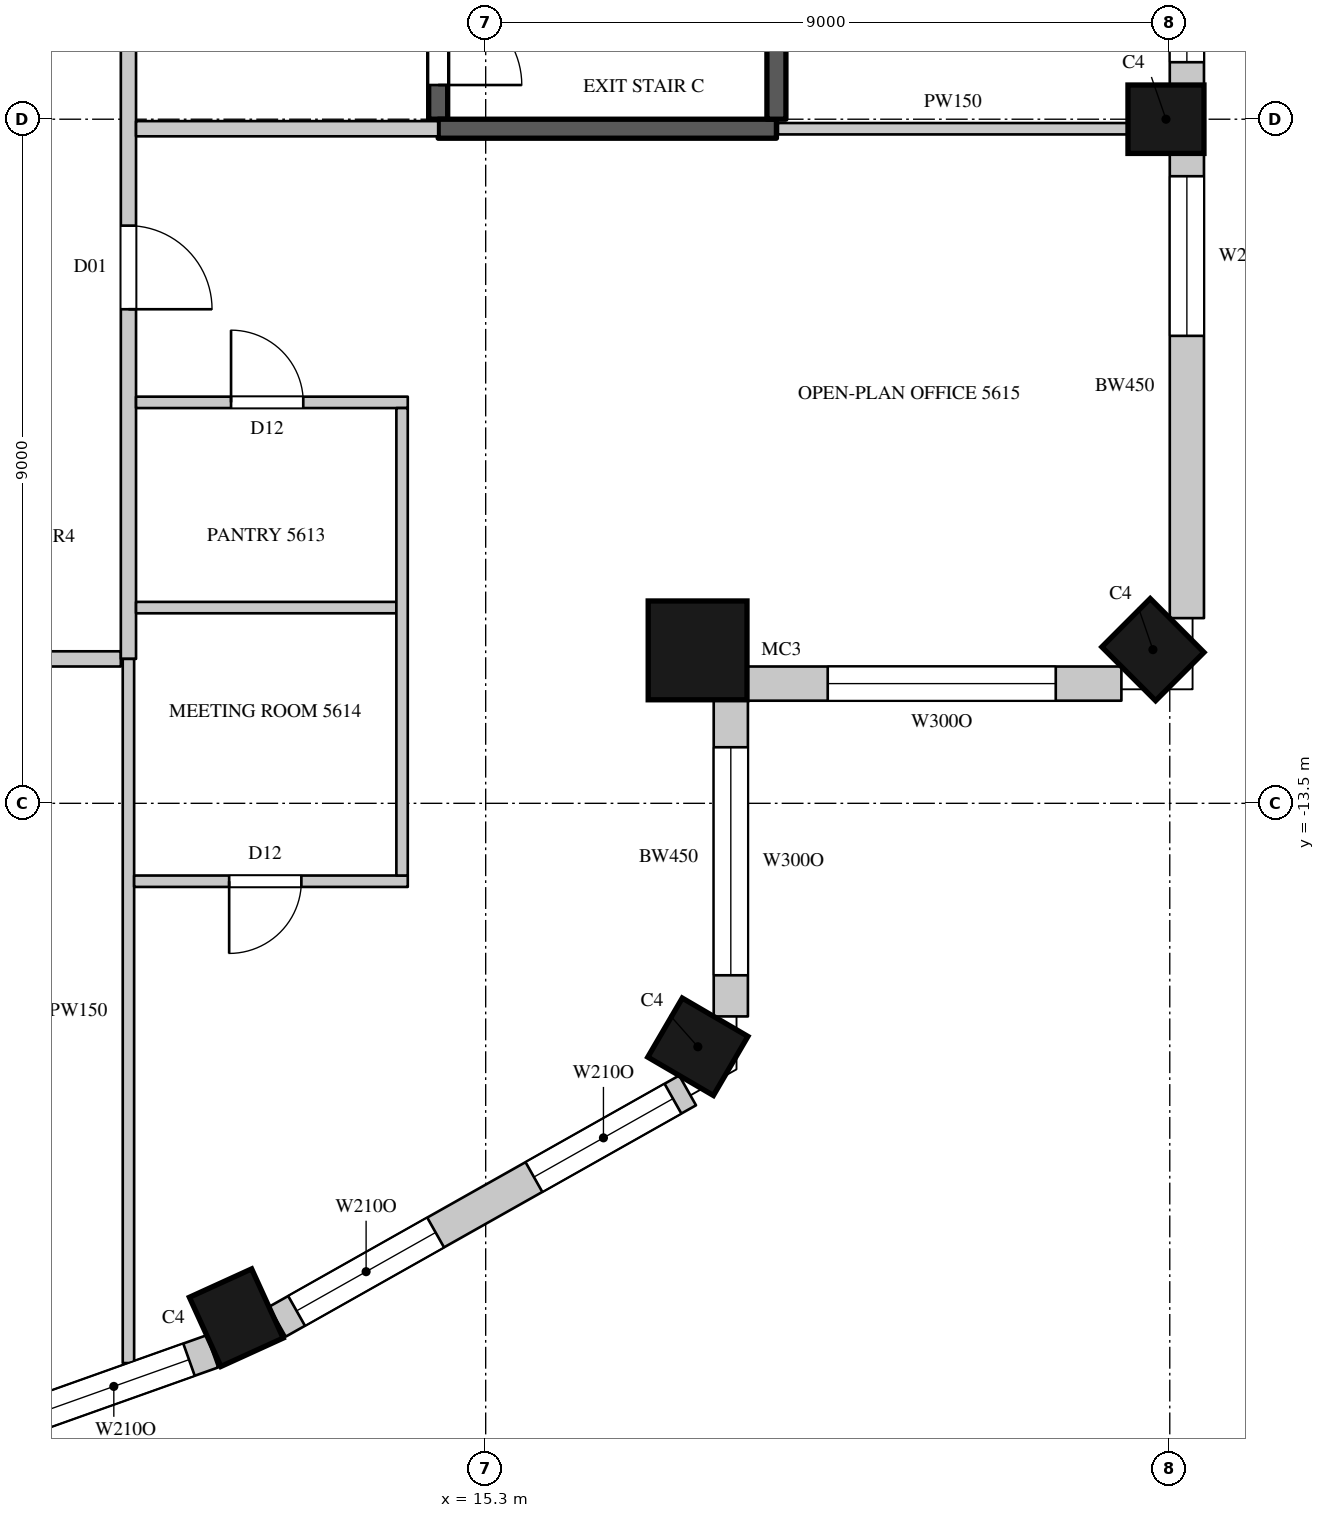
"""IFC4 building model, lengths in metres.
Left out: names, types, materials, properties, quantities, classifications, styles, units other than length and angle.
Written with IfcOpenShell. Run it as: python <this file> out.ifc"""

import sys

from ifc_helpers import new_model, si_unit, direction, frame, frame_2d, origin, origin_2d, place, context, subcontext, project, spatial, rectangle, circle, extrude, element, fill, save


model = new_model("IFC4")
c1 = context("Model", 3, precision=1e-05, world=origin(), true_north=direction((0.0, 1.0)))
c2 = subcontext(c1, "Body", "Model", "MODEL_VIEW")
j1 = project(units=[si_unit("LENGTHUNIT", "METRE"), si_unit("PLANEANGLEUNIT", "RADIAN")], contexts=[c1])
p1 = place(None, origin())
s1 = spatial("IfcSite", under=j1, at=p1, CompositionType="ELEMENT")
p2 = place(p1, origin())
s2 = spatial("IfcBuilding", under=s1, at=p2, CompositionType="ELEMENT")
p3 = place(p2, frame((0.0, 0.0, 251.6)))
s3 = spatial("IfcBuildingStorey", under=s2, at=p3, CompositionType="ELEMENT", Elevation=251.6)
for number, where, z_axis, x_axis in (
    (1, (12.019, -20.267, 0.0), (0.0, 0.0, 1.0), (0.91, 0.415, 0.0)),
    (2, (18.091, -16.703, 0.0), (0.0, 0.0, 1.0), (0.504, 0.863, 0.0)),
):
    element("IfcColumn", number, at=place(p3, frame(where, z_axis=z_axis, x_axis=x_axis)), inside=s3, PredefinedType="COLUMN", context=c2, shape_type="SweptSolid", body=[
        extrude(rectangle(XDim=0.9, YDim=1.0, at=origin_2d()), origin(), (0.0, 0.0, 1.0), 4.1),
    ])
p4 = place(p3, frame((18.088, -11.488, 0.0), z_axis=(0.0, 0.0, 1.0), x_axis=(1.0, 0.0, 0.0)))
e3 = element("IfcColumn", 3, at=p4, inside=s3, PredefinedType="COLUMN", context=c2, shape_type="SweptSolid", body=[
    extrude(circle(Radius=0.65, at=origin_2d()), origin(), (0.0, 0.0, 1.0), 4.1),
])
for number, where, z_axis, x_axis in (
    (4, (24.078, -11.478, 0.0), (0.0, 0.0, 1.0), (0.707, 0.707, 0.0)),
    (5, (24.25, -4.5, 0.0), (0.0, 0.0, 1.0), (0.0, 1.0, 0.0)),
):
    element("IfcColumn", number, at=place(p3, frame(where, z_axis=z_axis, x_axis=x_axis)), inside=s3, PredefinedType="COLUMN", context=c2, shape_type="SweptSolid", body=[
        extrude(rectangle(XDim=0.9, YDim=1.0, at=origin_2d()), origin(), (0.0, 0.0, 1.0), 4.1),
    ])
p5 = place(p3, frame((5.665, -22.859, 0.0), z_axis=(0.0, 0.0, 1.0), x_axis=(0.942108340262, 0.335308626803, 0.0)))
e6 = element("IfcWall", 6, at=p5, inside=s3, PredefinedType="SOLIDWALL", context=c2, shape_type="SweptSolid", body=[
    extrude(rectangle(XDim=6.412, YDim=0.45, at=frame_2d((3.206, 0.0))), origin(), (0.0, 0.0, 1.0), 3.8),
])
p6 = place(p5, frame((0.327, 0.0, 1.05)))
e7 = element("IfcOpeningElement", 7, at=p6, cuts=e6, PredefinedType="OPENING", context=c2, shape_type="SweptSolid", body=[
    extrude(rectangle(XDim=2.1, YDim=2.4, at=frame_2d((1.05, 1.2))), frame((0.0, 0.235, 0.0), z_axis=(0.0, -1.0, 0.0), x_axis=(1.0, 0.0, 0.0)), (0.0, 0.0, 1.0), 0.47),
])
p7 = place(p5, frame((3.985, 0.0, 1.05)))
e8 = element("IfcOpeningElement", 8, at=p7, cuts=e6, PredefinedType="OPENING", context=c2, shape_type="SweptSolid", body=[
    extrude(rectangle(XDim=2.1, YDim=2.4, at=frame_2d((1.05, 1.2))), frame((0.0, 0.235, 0.0), z_axis=(0.0, -1.0, 0.0), x_axis=(1.0, 0.0, 0.0)), (0.0, 0.0, 1.0), 0.47),
])
p8 = place(p3, frame((12.559, -20.32, 0.0), z_axis=(0.0, 0.0, 1.0), x_axis=(0.871065783524, 0.491166367714, 0.0)))
e9 = element("IfcWall", 9, at=p8, inside=s3, PredefinedType="SOLIDWALL", context=c2, shape_type="SweptSolid", body=[
    extrude(rectangle(XDim=6.196, YDim=0.45, at=frame_2d((3.098, 0.0))), origin(), (0.0, 0.0, 1.0), 3.8),
])
p9 = place(p8, frame((0.291, 0.0, 1.05)))
e10 = element("IfcOpeningElement", 10, at=p9, cuts=e9, PredefinedType="OPENING", context=c2, shape_type="SweptSolid", body=[
    extrude(rectangle(XDim=2.1, YDim=2.4, at=frame_2d((1.05, 1.2))), frame((0.0, 0.235, 0.0), z_axis=(0.0, -1.0, 0.0), x_axis=(1.0, 0.0, 0.0)), (0.0, 0.0, 1.0), 0.47),
])
p10 = place(p8, frame((3.875, 0.0, 1.05)))
e11 = element("IfcOpeningElement", 11, at=p10, cuts=e9, PredefinedType="OPENING", context=c2, shape_type="SweptSolid", body=[
    extrude(rectangle(XDim=2.1, YDim=2.4, at=frame_2d((1.05, 1.2))), frame((0.0, 0.235, 0.0), z_axis=(0.0, -1.0, 0.0), x_axis=(1.0, 0.0, 0.0)), (0.0, 0.0, 1.0), 0.47),
])
p11 = place(p3, frame((18.525, -16.304, 0.0), z_axis=(0.0, 0.0, 1.0), x_axis=(0.0, 1.0, 0.0)))
e12 = element("IfcWall", 12, at=p11, inside=s3, PredefinedType="SOLIDWALL", context=c2, shape_type="SweptSolid", body=[
    extrude(rectangle(XDim=4.202, YDim=0.45, at=frame_2d((2.101, 0.0))), origin(), (0.0, 0.0, 1.0), 3.8),
])
p12 = place(p11, frame((0.541, 0.0, 1.05)))
e13 = element("IfcOpeningElement", 13, at=p12, cuts=e12, PredefinedType="OPENING", context=c2, shape_type="SweptSolid", body=[
    extrude(rectangle(XDim=3.0, YDim=2.4, at=frame_2d((1.5, 1.2))), frame((0.0, 0.235, 0.0), z_axis=(0.0, -1.0, 0.0), x_axis=(1.0, 0.0, 0.0)), (0.0, 0.0, 1.0), 0.47),
])
p13 = place(p3, frame((18.701, -11.925, 0.0), z_axis=(0.0, 0.0, 1.0), x_axis=(1.0, 0.0, 0.0)))
e14 = element("IfcWall", 14, at=p13, inside=s3, PredefinedType="SOLIDWALL", context=c2, shape_type="SweptSolid", body=[
    extrude(rectangle(XDim=4.962, YDim=0.45, at=frame_2d((2.481, 0.0))), origin(), (0.0, 0.0, 1.0), 3.8),
])
p14 = place(p13, frame((1.098, 0.0, 1.05)))
e15 = element("IfcOpeningElement", 15, at=p14, cuts=e14, PredefinedType="OPENING", context=c2, shape_type="SweptSolid", body=[
    extrude(rectangle(XDim=3.0, YDim=2.4, at=frame_2d((1.5, 1.2))), frame((0.0, 0.235, 0.0), z_axis=(0.0, -1.0, 0.0), x_axis=(1.0, 0.0, 0.0)), (0.0, 0.0, 1.0), 0.47),
])
p15 = place(p3, frame((24.525, -11.064, 0.0), z_axis=(0.0, 0.0, 1.0), x_axis=(0.0, 1.0, 0.0)))
e16 = element("IfcWall", 16, at=p15, inside=s3, PredefinedType="SOLIDWALL", context=c2, shape_type="SweptSolid", body=[
    extrude(rectangle(XDim=6.114, YDim=0.45, at=frame_2d((3.057, 0.0))), origin(), (0.0, 0.0, 1.0), 3.8),
])
p16 = place(p15, frame((3.714, 0.0, 1.05)))
e17 = element("IfcOpeningElement", 17, at=p16, cuts=e16, PredefinedType="OPENING", context=c2, shape_type="SweptSolid", body=[
    extrude(rectangle(XDim=2.1, YDim=2.4, at=frame_2d((1.05, 1.2))), frame((0.0, 0.235, 0.0), z_axis=(0.0, -1.0, 0.0), x_axis=(1.0, 0.0, 0.0)), (0.0, 0.0, 1.0), 0.47),
])
p17 = place(p3, frame((24.525, -4.05, 0.0), z_axis=(0.0, 0.0, 1.0), x_axis=(0.0, 1.0, 0.0)))
e18 = element("IfcWall", 18, at=p17, inside=s3, PredefinedType="SOLIDWALL", context=c2, shape_type="SweptSolid", body=[
    extrude(rectangle(XDim=8.1, YDim=0.45, at=frame_2d((4.05, 0.0))), origin(), (0.0, 0.0, 1.0), 3.8),
])
p18 = place(p17, frame((0.3, 0.0, 1.05)))
e19 = element("IfcOpeningElement", 19, at=p18, cuts=e18, PredefinedType="OPENING", context=c2, shape_type="SweptSolid", body=[
    extrude(rectangle(XDim=3.0, YDim=2.4, at=frame_2d((1.5, 1.2))), frame((0.0, 0.235, 0.0), z_axis=(0.0, -1.0, 0.0), x_axis=(1.0, 0.0, 0.0)), (0.0, 0.0, 1.0), 0.47),
])
p19 = place(p17, frame((4.8, 0.0, 1.05)))
e20 = element("IfcOpeningElement", 20, at=p19, cuts=e18, PredefinedType="OPENING", context=c2, shape_type="SweptSolid", body=[
    extrude(rectangle(XDim=3.0, YDim=2.4, at=frame_2d((1.5, 1.2))), frame((0.0, 0.235, 0.0), z_axis=(0.0, -1.0, 0.0), x_axis=(1.0, 0.0, 0.0)), (0.0, 0.0, 1.0), 0.47),
])
p20 = place(p3, frame((-10.9, -11.6, 0.0), z_axis=(0.0, 0.0, 1.0), x_axis=(1.0, 0.0, 0.0)))
e21 = element("IfcWall", 21, at=p20, inside=s3, PredefinedType="PARTITIONING", context=c2, shape_type="SweptSolid", body=[
    extrude(rectangle(XDim=21.4, YDim=0.2, at=frame_2d((10.7, 0.0))), origin(), (0.0, 0.0, 1.0), 3.8),
])
p21 = place(p20, frame((0.95, 0.0, 0.0)))
e22 = element("IfcOpeningElement", 22, at=p21, cuts=e21, PredefinedType="OPENING", context=c2, shape_type="SweptSolid", body=[
    extrude(rectangle(XDim=0.9, YDim=2.2, at=frame_2d((0.45, 1.1))), frame((0.0, 0.11, 0.0), z_axis=(0.0, -1.0, 0.0), x_axis=(1.0, 0.0, 0.0)), (0.0, 0.0, 1.0), 0.22),
])
p22 = place(p20, frame((4.2, 0.0, 0.0)))
e23 = element("IfcOpeningElement", 23, at=p22, cuts=e21, PredefinedType="OPENING", context=c2, shape_type="SweptSolid", body=[
    extrude(rectangle(XDim=0.9, YDim=2.2, at=frame_2d((0.45, 1.1))), frame((0.0, 0.11, 0.0), z_axis=(0.0, -1.0, 0.0), x_axis=(1.0, 0.0, 0.0)), (0.0, 0.0, 1.0), 0.22),
])
p23 = place(p20, frame((6.85, 0.0, 0.0)))
e24 = element("IfcOpeningElement", 24, at=p23, cuts=e21, PredefinedType="OPENING", context=c2, shape_type="SweptSolid", body=[
    extrude(rectangle(XDim=1.1, YDim=2.4, at=frame_2d((0.55, 1.2))), frame((0.0, 0.11, 0.0), z_axis=(0.0, -1.0, 0.0), x_axis=(1.0, 0.0, 0.0)), (0.0, 0.0, 1.0), 0.22),
])
p24 = place(p20, frame((9.8, 0.0, 0.0)))
e25 = element("IfcOpeningElement", 25, at=p24, cuts=e21, PredefinedType="OPENING", context=c2, shape_type="SweptSolid", body=[
    extrude(rectangle(XDim=1.1, YDim=2.4, at=frame_2d((0.55, 1.2))), frame((0.0, 0.11, 0.0), z_axis=(0.0, -1.0, 0.0), x_axis=(1.0, 0.0, 0.0)), (0.0, 0.0, 1.0), 0.22),
])
p25 = place(p3, frame((10.6, -11.6, 0.0), z_axis=(0.0, 0.0, 1.0), x_axis=(0.0, 1.0, 0.0)))
e26 = element("IfcWall", 26, at=p25, inside=s3, PredefinedType="PARTITIONING", context=c2, shape_type="SweptSolid", body=[
    extrude(rectangle(XDim=23.7, YDim=0.2, at=frame_2d((11.85, 0.0))), origin(), (0.0, 0.0, 1.0), 3.8),
])
p26 = place(p25, frame((9.45, 0.0, 0.0)))
e27 = element("IfcOpeningElement", 27, at=p26, cuts=e26, PredefinedType="OPENING", context=c2, shape_type="SweptSolid", body=[
    extrude(rectangle(XDim=1.5, YDim=2.4, at=frame_2d((0.75, 1.2))), frame((0.0, 0.11, 0.0), z_axis=(0.0, -1.0, 0.0), x_axis=(1.0, 0.0, 0.0)), (0.0, 0.0, 1.0), 0.22),
])
p27 = place(p25, frame((19.45, 0.0, 0.0)))
e28 = element("IfcOpeningElement", 28, at=p27, cuts=e26, PredefinedType="OPENING", context=c2, shape_type="SweptSolid", body=[
    extrude(rectangle(XDim=1.1, YDim=2.4, at=frame_2d((0.55, 1.2))), frame((0.0, 0.11, 0.0), z_axis=(0.0, -1.0, 0.0), x_axis=(1.0, 0.0, 0.0)), (0.0, 0.0, 1.0), 0.22),
])
p28 = place(p25, frame((4.6, 0.0, 0.0)))
e29 = element("IfcOpeningElement", 29, at=p28, cuts=e26, PredefinedType="OPENING", context=c2, shape_type="SweptSolid", body=[
    extrude(rectangle(XDim=1.1, YDim=2.4, at=frame_2d((0.55, 1.2))), frame((0.0, 0.11, 0.0), z_axis=(0.0, -1.0, 0.0), x_axis=(1.0, 0.0, 0.0)), (0.0, 0.0, 1.0), 0.22),
])
p29 = place(p3, frame((10.7, -4.625, 0.0), z_axis=(0.0, 0.0, 1.0), x_axis=(1.0, 0.0, 0.0)))
e30 = element("IfcWall", 30, at=p29, inside=s3, PredefinedType="PARTITIONING", context=c2, shape_type="SweptSolid", body=[
    extrude(rectangle(XDim=3.975, YDim=0.2, at=frame_2d((1.988, 0.0))), origin(), (0.0, 0.0, 1.0), 3.8),
])
p30 = place(p3, frame((10.6, -20.864, 0.0), z_axis=(0.0, 0.0, 1.0), x_axis=(0.0, 1.0, 0.0)))
e31 = element("IfcWall", 31, at=p30, inside=s3, PredefinedType="PARTITIONING", context=c2, shape_type="SweptSolid", body=[
    extrude(rectangle(XDim=9.264, YDim=0.15, at=frame_2d((4.632, 0.0))), origin(), (0.0, 0.0, 1.0), 3.8),
])
p31 = place(p3, frame((10.675, -14.525, 0.0), z_axis=(0.0, 0.0, 1.0), x_axis=(1.0, 0.0, 0.0)))
e32 = element("IfcWall", 32, at=p31, inside=s3, PredefinedType="PARTITIONING", context=c2, shape_type="SweptSolid", body=[
    extrude(rectangle(XDim=3.6, YDim=0.15, at=frame_2d((1.8, 0.0))), origin(), (0.0, 0.0, 1.0), 3.8),
])
p32 = place(p31, frame((1.25, 0.0, 0.0)))
e33 = element("IfcOpeningElement", 33, at=p32, cuts=e32, PredefinedType="OPENING", context=c2, shape_type="SweptSolid", body=[
    extrude(rectangle(XDim=0.95, YDim=2.2, at=frame_2d((0.475, 1.1))), frame((0.0, 0.085, 0.0), z_axis=(0.0, -1.0, 0.0), x_axis=(1.0, 0.0, 0.0)), (0.0, 0.0, 1.0), 0.17),
])
p33 = place(p3, frame((10.7, -10.925, 0.0), z_axis=(0.0, 0.0, 1.0), x_axis=(1.0, 0.0, 0.0)))
e34 = element("IfcWall", 34, at=p33, inside=s3, PredefinedType="PARTITIONING", context=c2, shape_type="SweptSolid", body=[
    extrude(rectangle(XDim=3.425, YDim=0.15, at=frame_2d((1.712, 0.0))), origin(), (0.0, 0.0, 1.0), 3.8),
])
p34 = place(p3, frame((10.7, -8.225, 0.0), z_axis=(0.0, 0.0, 1.0), x_axis=(1.0, 0.0, 0.0)))
e35 = element("IfcWall", 35, at=p34, inside=s3, PredefinedType="PARTITIONING", context=c2, shape_type="SweptSolid", body=[
    extrude(rectangle(XDim=3.575, YDim=0.15, at=frame_2d((1.788, 0.0))), origin(), (0.0, 0.0, 1.0), 3.15),
])
p35 = place(p34, frame((1.25, 0.0, 0.0)))
e36 = element("IfcOpeningElement", 36, at=p35, cuts=e35, PredefinedType="OPENING", context=c2, shape_type="SweptSolid", body=[
    extrude(rectangle(XDim=0.95, YDim=2.2, at=frame_2d((0.475, 1.1))), frame((0.0, 0.085, 0.0), z_axis=(0.0, -1.0, 0.0), x_axis=(1.0, 0.0, 0.0)), (0.0, 0.0, 1.0), 0.17),
])
p36 = place(p3, frame((14.2, -14.45, 0.0), z_axis=(0.0, 0.0, 1.0), x_axis=(0.0, 1.0, 0.0)))
e37 = element("IfcWall", 37, at=p36, inside=s3, PredefinedType="PARTITIONING", context=c2, shape_type="SweptSolid", body=[
    extrude(rectangle(XDim=6.15, YDim=0.15, at=frame_2d((3.075, 0.0))), origin(), (0.0, 0.0, 1.0), 3.8),
])
p37 = place(p3, frame((19.145, -4.625, 0.0), z_axis=(0.0, 0.0, 1.0), x_axis=(1.0, 0.0, 0.0)))
e38 = element("IfcWall", 38, at=p37, inside=s3, PredefinedType="PARTITIONING", context=c2, shape_type="SweptSolid", body=[
    extrude(rectangle(XDim=4.605, YDim=0.15, at=frame_2d((2.302, 0.0))), origin(), (0.0, 0.0, 1.0), 3.8),
])
p38 = place(p3, frame((14.675, -4.5, 0.0), z_axis=(0.0, 0.0, 1.0), x_axis=(0.0, 1.0, 0.0)))
e39 = element("IfcWall", 39, at=p38, inside=s3, PredefinedType="SHEAR", context=c2, shape_type="SweptSolid", body=[
    extrude(rectangle(XDim=9.0, YDim=0.25, at=frame_2d((4.5, 0.0))), origin(), (0.0, 0.0, 1.0), 3.8),
])
p39 = place(p38, frame((0.45, 0.0, 0.0)))
e40 = element("IfcOpeningElement", 40, at=p39, cuts=e39, PredefinedType="OPENING", context=c2, shape_type="SweptSolid", body=[
    extrude(rectangle(XDim=1.1, YDim=2.2, at=frame_2d((0.55, 1.1))), frame((0.0, 0.135, 0.0), z_axis=(0.0, -1.0, 0.0), x_axis=(1.0, 0.0, 0.0)), (0.0, 0.0, 1.0), 0.27),
])
p40 = place(p3, frame((14.675, -4.625, 0.0), z_axis=(0.0, 0.0, 1.0), x_axis=(1.0, 0.0, 0.0)))
e41 = element("IfcWall", 41, at=p40, inside=s3, PredefinedType="SHEAR", context=c2, shape_type="SweptSolid", body=[
    extrude(rectangle(XDim=4.45, YDim=0.25, at=frame_2d((2.225, 0.0))), origin(), (0.0, 0.0, 1.0), 3.8),
])
p41 = place(p3, frame((19.125, -4.5, 0.0), z_axis=(0.0, 0.0, 1.0), x_axis=(0.0, 1.0, 0.0)))
e42 = element("IfcWall", 42, at=p41, inside=s3, PredefinedType="SHEAR", context=c2, shape_type="SweptSolid", body=[
    extrude(rectangle(XDim=9.0, YDim=0.25, at=frame_2d((4.5, 0.0))), origin(), (0.0, 0.0, 1.0), 3.8),
])
p42 = place(p7, origin())
e43 = element("IfcWindow", 43, at=p42, inside=s3, PartitioningType="SINGLE_PANEL", PredefinedType="WINDOW", context=c2, shape_type="SweptSolid", body=[
    extrude(rectangle(XDim=2.1, YDim=2.4, at=frame_2d((1.05, 1.2))), frame((0.0, 0.135, 0.0), z_axis=(0.0, -1.0, 0.0), x_axis=(1.0, 0.0, 0.0)), (0.0, 0.0, 1.0), 0.06),
])
fill(e8, e43)
p43 = place(p9, origin())
e44 = element("IfcWindow", 44, at=p43, inside=s3, PartitioningType="SINGLE_PANEL", PredefinedType="WINDOW", context=c2, shape_type="SweptSolid", body=[
    extrude(rectangle(XDim=2.1, YDim=2.4, at=frame_2d((1.05, 1.2))), frame((0.0, 0.135, 0.0), z_axis=(0.0, -1.0, 0.0), x_axis=(1.0, 0.0, 0.0)), (0.0, 0.0, 1.0), 0.06),
])
fill(e10, e44)
p44 = place(p10, origin())
e45 = element("IfcWindow", 45, at=p44, inside=s3, PartitioningType="SINGLE_PANEL", PredefinedType="WINDOW", context=c2, shape_type="SweptSolid", body=[
    extrude(rectangle(XDim=2.1, YDim=2.4, at=frame_2d((1.05, 1.2))), frame((0.0, 0.135, 0.0), z_axis=(0.0, -1.0, 0.0), x_axis=(1.0, 0.0, 0.0)), (0.0, 0.0, 1.0), 0.06),
])
fill(e11, e45)
p45 = place(p12, origin())
e46 = element("IfcWindow", 46, at=p45, inside=s3, PartitioningType="SINGLE_PANEL", PredefinedType="WINDOW", context=c2, shape_type="SweptSolid", body=[
    extrude(rectangle(XDim=3.0, YDim=2.4, at=frame_2d((1.5, 1.2))), frame((0.0, 0.135, 0.0), z_axis=(0.0, -1.0, 0.0), x_axis=(1.0, 0.0, 0.0)), (0.0, 0.0, 1.0), 0.06),
])
fill(e13, e46)
p46 = place(p14, origin())
e47 = element("IfcWindow", 47, at=p46, inside=s3, PartitioningType="SINGLE_PANEL", PredefinedType="WINDOW", context=c2, shape_type="SweptSolid", body=[
    extrude(rectangle(XDim=3.0, YDim=2.4, at=frame_2d((1.5, 1.2))), frame((0.0, 0.135, 0.0), z_axis=(0.0, -1.0, 0.0), x_axis=(1.0, 0.0, 0.0)), (0.0, 0.0, 1.0), 0.06),
])
fill(e15, e47)
p47 = place(p16, origin())
e48 = element("IfcWindow", 48, at=p47, inside=s3, PartitioningType="SINGLE_PANEL", PredefinedType="WINDOW", context=c2, shape_type="SweptSolid", body=[
    extrude(rectangle(XDim=2.1, YDim=2.4, at=frame_2d((1.05, 1.2))), frame((0.0, 0.135, 0.0), z_axis=(0.0, -1.0, 0.0), x_axis=(1.0, 0.0, 0.0)), (0.0, 0.0, 1.0), 0.06),
])
fill(e17, e48)
p48 = place(p18, origin())
e49 = element("IfcWindow", 49, at=p48, inside=s3, PartitioningType="SINGLE_PANEL", PredefinedType="WINDOW", context=c2, shape_type="SweptSolid", body=[
    extrude(rectangle(XDim=3.0, YDim=2.4, at=frame_2d((1.5, 1.2))), frame((0.0, 0.135, 0.0), z_axis=(0.0, -1.0, 0.0), x_axis=(1.0, 0.0, 0.0)), (0.0, 0.0, 1.0), 0.06),
])
fill(e19, e49)
p49 = place(p28, origin())
e50 = element("IfcDoor", 50, at=p49, inside=s3, OperationType="SINGLE_SWING_RIGHT", PredefinedType="DOOR", context=c2, shape_type="SweptSolid", body=[
    extrude(rectangle(XDim=1.1, YDim=2.4, at=frame_2d((0.55, 1.2))), frame((0.0, 0.025, 0.0), z_axis=(0.0, -1.0, 0.0), x_axis=(1.0, 0.0, 0.0)), (0.0, 0.0, 1.0), 0.05),
])
fill(e29, e50)
p50 = place(p35, origin())
e51 = element("IfcDoor", 51, at=p50, inside=s3, OperationType="SINGLE_SWING_LEFT", PredefinedType="DOOR", context=c2, shape_type="SweptSolid", body=[
    extrude(rectangle(XDim=0.95, YDim=2.2, at=frame_2d((0.475, 1.1))), frame((0.0, 0.025, 0.0), z_axis=(0.0, -1.0, 0.0), x_axis=(1.0, 0.0, 0.0)), (0.0, 0.0, 1.0), 0.05),
])
fill(e36, e51)
p51 = place(p32, origin())
e52 = element("IfcDoor", 52, at=p51, inside=s3, OperationType="SINGLE_SWING_RIGHT", PredefinedType="DOOR", context=c2, shape_type="SweptSolid", body=[
    extrude(rectangle(XDim=0.95, YDim=2.2, at=frame_2d((0.475, 1.1))), frame((0.0, 0.025, 0.0), z_axis=(0.0, -1.0, 0.0), x_axis=(1.0, 0.0, 0.0)), (0.0, 0.0, 1.0), 0.05),
])
fill(e33, e52)
p52 = place(p39, origin())
e53 = element("IfcDoor", 53, at=p52, inside=s3, OperationType="SINGLE_SWING_RIGHT", PredefinedType="DOOR", context=c2, shape_type="SweptSolid", body=[
    extrude(rectangle(XDim=1.1, YDim=2.2, at=frame_2d((0.55, 1.1))), frame((0.0, 0.025, 0.0), z_axis=(0.0, -1.0, 0.0), x_axis=(1.0, 0.0, 0.0)), (0.0, 0.0, 1.0), 0.05),
])
fill(e40, e53)
save(model, sys.argv[1])
